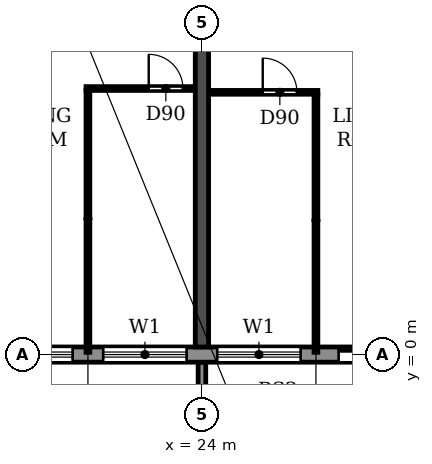
"""IFC4 building model, lengths in metres.
Left out: names, types, materials, properties, quantities, classifications, styles, units other than length and angle.
Written with IfcOpenShell. Run it as: python <this file> out.ifc"""

import sys

from ifc_helpers import new_model, si_unit, direction, frame, frame_2d, origin, place, context, subcontext, project, spatial, polyline, rectangle, outline, extrude, source, transform, mapped, element, fill, save


model = new_model("IFC4")
c1 = context("Model", 3, precision=1e-05, world=origin(), true_north=direction((0.0, 1.0)))
c2 = subcontext(c1, "Body", "Model", "MODEL_VIEW")
j1 = project(units=[si_unit("LENGTHUNIT", "METRE"), si_unit("PLANEANGLEUNIT", "RADIAN")], contexts=[c1])
p1 = place(None, origin())
s1 = spatial("IfcSite", under=j1, at=p1, CompositionType="ELEMENT")
p2 = place(p1, origin())
s2 = spatial("IfcBuilding", under=s1, at=p2, CompositionType="ELEMENT")
p3 = place(p2, frame((0.0, 0.0, 76.2)))
s3 = spatial("IfcBuildingStorey", under=s2, at=p3, CompositionType="ELEMENT", Elevation=76.2)
p4 = place(p3, frame((24.0, 0.2, 0.0), z_axis=(0.0, 0.0, 1.0), x_axis=(0.0, 1.0, 0.0)))
e1 = element("IfcWall", 1, at=p4, inside=s3, PredefinedType="SHEAR", context=c2, shape_type="SweptSolid", body=[
    extrude(rectangle(XDim=11.675, YDim=0.35, at=frame_2d((5.837, 0.0))), origin(), (0.0, 0.0, 1.0), 3.06),
])
p5 = place(p3, frame((10.683, 0.0, 0.0), z_axis=(0.0, 0.0, 1.0), x_axis=(1.0, 0.0, 0.0)))
e2 = element("IfcWall", 2, at=p5, inside=s3, PredefinedType="STANDARD", context=c2, shape_type="SweptSolid", body=[
    extrude(rectangle(XDim=80.634, YDim=0.4, at=frame_2d((40.317, 0.0))), origin(), (0.0, 0.0, 1.0), 3.06),
])
p6 = place(p5, frame((1.717, 0.0, 0.9)))
e3 = element("IfcOpeningElement", 3, at=p6, cuts=e2, PredefinedType="OPENING", context=c2, shape_type="SweptSolid", body=[
    extrude(rectangle(XDim=2.2, YDim=1.5, at=frame_2d((1.1, 0.75))), frame((0.0, 0.21, 0.0), z_axis=(0.0, -1.0, 0.0), x_axis=(1.0, 0.0, 0.0)), (0.0, 0.0, 1.0), 0.42),
])
p7 = place(p5, frame((4.917, 0.0, 0.0)))
e4 = element("IfcOpeningElement", 4, at=p7, cuts=e2, PredefinedType="OPENING", context=c2, shape_type="SweptSolid", body=[
    extrude(rectangle(XDim=1.8, YDim=2.4, at=frame_2d((0.9, 1.2))), frame((0.0, 0.21, 0.0), z_axis=(0.0, -1.0, 0.0), x_axis=(1.0, 0.0, 0.0)), (0.0, 0.0, 1.0), 0.42),
])
p8 = place(p5, frame((7.717, 0.0, 0.9)))
e5 = element("IfcOpeningElement", 5, at=p8, cuts=e2, PredefinedType="OPENING", context=c2, shape_type="SweptSolid", body=[
    extrude(rectangle(XDim=2.2, YDim=1.5, at=frame_2d((1.1, 0.75))), frame((0.0, 0.21, 0.0), z_axis=(0.0, -1.0, 0.0), x_axis=(1.0, 0.0, 0.0)), (0.0, 0.0, 1.0), 0.42),
])
p9 = place(p5, frame((10.717, 0.0, 0.9)))
e6 = element("IfcOpeningElement", 6, at=p9, cuts=e2, PredefinedType="OPENING", context=c2, shape_type="SweptSolid", body=[
    extrude(rectangle(XDim=2.2, YDim=1.5, at=frame_2d((1.1, 0.75))), frame((0.0, 0.21, 0.0), z_axis=(0.0, -1.0, 0.0), x_axis=(1.0, 0.0, 0.0)), (0.0, 0.0, 1.0), 0.42),
])
p10 = place(p5, frame((13.717, 0.0, 0.9)))
e7 = element("IfcOpeningElement", 7, at=p10, cuts=e2, PredefinedType="OPENING", context=c2, shape_type="SweptSolid", body=[
    extrude(rectangle(XDim=2.2, YDim=1.5, at=frame_2d((1.1, 0.75))), frame((0.0, 0.21, 0.0), z_axis=(0.0, -1.0, 0.0), x_axis=(1.0, 0.0, 0.0)), (0.0, 0.0, 1.0), 0.42),
])
p11 = place(p5, frame((16.917, 0.0, 0.0)))
e8 = element("IfcOpeningElement", 8, at=p11, cuts=e2, PredefinedType="OPENING", context=c2, shape_type="SweptSolid", body=[
    extrude(rectangle(XDim=1.8, YDim=2.4, at=frame_2d((0.9, 1.2))), frame((0.0, 0.21, 0.0), z_axis=(0.0, -1.0, 0.0), x_axis=(1.0, 0.0, 0.0)), (0.0, 0.0, 1.0), 0.42),
])
p12 = place(p5, frame((19.717, 0.0, 0.9)))
e9 = element("IfcOpeningElement", 9, at=p12, cuts=e2, PredefinedType="OPENING", context=c2, shape_type="SweptSolid", body=[
    extrude(rectangle(XDim=2.2, YDim=1.5, at=frame_2d((1.1, 0.75))), frame((0.0, 0.21, 0.0), z_axis=(0.0, -1.0, 0.0), x_axis=(1.0, 0.0, 0.0)), (0.0, 0.0, 1.0), 0.42),
])
p13 = place(p5, frame((22.717, 0.0, 0.9)))
e10 = element("IfcOpeningElement", 10, at=p13, cuts=e2, PredefinedType="OPENING", context=c2, shape_type="SweptSolid", body=[
    extrude(rectangle(XDim=2.2, YDim=1.5, at=frame_2d((1.1, 0.75))), frame((0.0, 0.21, 0.0), z_axis=(0.0, -1.0, 0.0), x_axis=(1.0, 0.0, 0.0)), (0.0, 0.0, 1.0), 0.42),
])
p14 = place(p5, frame((25.917, 0.0, 0.0)))
e11 = element("IfcOpeningElement", 11, at=p14, cuts=e2, PredefinedType="OPENING", context=c2, shape_type="SweptSolid", body=[
    extrude(rectangle(XDim=1.8, YDim=2.4, at=frame_2d((0.9, 1.2))), frame((0.0, 0.21, 0.0), z_axis=(0.0, -1.0, 0.0), x_axis=(1.0, 0.0, 0.0)), (0.0, 0.0, 1.0), 0.42),
])
p15 = place(p5, frame((28.717, 0.0, 0.9)))
e12 = element("IfcOpeningElement", 12, at=p15, cuts=e2, PredefinedType="OPENING", context=c2, shape_type="SweptSolid", body=[
    extrude(rectangle(XDim=2.2, YDim=1.5, at=frame_2d((1.1, 0.75))), frame((0.0, 0.21, 0.0), z_axis=(0.0, -1.0, 0.0), x_axis=(1.0, 0.0, 0.0)), (0.0, 0.0, 1.0), 0.42),
])
p16 = place(p5, frame((31.717, 0.0, 0.9)))
e13 = element("IfcOpeningElement", 13, at=p16, cuts=e2, PredefinedType="OPENING", context=c2, shape_type="SweptSolid", body=[
    extrude(rectangle(XDim=2.2, YDim=1.5, at=frame_2d((1.1, 0.75))), frame((0.0, 0.21, 0.0), z_axis=(0.0, -1.0, 0.0), x_axis=(1.0, 0.0, 0.0)), (0.0, 0.0, 1.0), 0.42),
])
p17 = place(p5, frame((34.717, 0.0, 0.9)))
e14 = element("IfcOpeningElement", 14, at=p17, cuts=e2, PredefinedType="OPENING", context=c2, shape_type="SweptSolid", body=[
    extrude(rectangle(XDim=2.2, YDim=1.5, at=frame_2d((1.1, 0.75))), frame((0.0, 0.21, 0.0), z_axis=(0.0, -1.0, 0.0), x_axis=(1.0, 0.0, 0.0)), (0.0, 0.0, 1.0), 0.42),
])
p18 = place(p5, frame((37.917, 0.0, 0.0)))
e15 = element("IfcOpeningElement", 15, at=p18, cuts=e2, PredefinedType="OPENING", context=c2, shape_type="SweptSolid", body=[
    extrude(rectangle(XDim=1.8, YDim=2.4, at=frame_2d((0.9, 1.2))), frame((0.0, 0.21, 0.0), z_axis=(0.0, -1.0, 0.0), x_axis=(1.0, 0.0, 0.0)), (0.0, 0.0, 1.0), 0.42),
])
p19 = place(p5, frame((40.717, 0.0, 0.9)))
e16 = element("IfcOpeningElement", 16, at=p19, cuts=e2, PredefinedType="OPENING", context=c2, shape_type="SweptSolid", body=[
    extrude(rectangle(XDim=2.2, YDim=1.5, at=frame_2d((1.1, 0.75))), frame((0.0, 0.21, 0.0), z_axis=(0.0, -1.0, 0.0), x_axis=(1.0, 0.0, 0.0)), (0.0, 0.0, 1.0), 0.42),
])
p20 = place(p5, frame((43.717, 0.0, 0.9)))
e17 = element("IfcOpeningElement", 17, at=p20, cuts=e2, PredefinedType="OPENING", context=c2, shape_type="SweptSolid", body=[
    extrude(rectangle(XDim=2.2, YDim=1.5, at=frame_2d((1.1, 0.75))), frame((0.0, 0.21, 0.0), z_axis=(0.0, -1.0, 0.0), x_axis=(1.0, 0.0, 0.0)), (0.0, 0.0, 1.0), 0.42),
])
p21 = place(p5, frame((46.717, 0.0, 0.9)))
e18 = element("IfcOpeningElement", 18, at=p21, cuts=e2, PredefinedType="OPENING", context=c2, shape_type="SweptSolid", body=[
    extrude(rectangle(XDim=2.2, YDim=1.5, at=frame_2d((1.1, 0.75))), frame((0.0, 0.21, 0.0), z_axis=(0.0, -1.0, 0.0), x_axis=(1.0, 0.0, 0.0)), (0.0, 0.0, 1.0), 0.42),
])
p22 = place(p5, frame((49.917, 0.0, 0.0)))
e19 = element("IfcOpeningElement", 19, at=p22, cuts=e2, PredefinedType="OPENING", context=c2, shape_type="SweptSolid", body=[
    extrude(rectangle(XDim=1.8, YDim=2.4, at=frame_2d((0.9, 1.2))), frame((0.0, 0.21, 0.0), z_axis=(0.0, -1.0, 0.0), x_axis=(1.0, 0.0, 0.0)), (0.0, 0.0, 1.0), 0.42),
])
p23 = place(p5, frame((52.717, 0.0, 0.9)))
e20 = element("IfcOpeningElement", 20, at=p23, cuts=e2, PredefinedType="OPENING", context=c2, shape_type="SweptSolid", body=[
    extrude(rectangle(XDim=2.2, YDim=1.5, at=frame_2d((1.1, 0.75))), frame((0.0, 0.21, 0.0), z_axis=(0.0, -1.0, 0.0), x_axis=(1.0, 0.0, 0.0)), (0.0, 0.0, 1.0), 0.42),
])
p24 = place(p5, frame((55.717, 0.0, 0.9)))
e21 = element("IfcOpeningElement", 21, at=p24, cuts=e2, PredefinedType="OPENING", context=c2, shape_type="SweptSolid", body=[
    extrude(rectangle(XDim=2.2, YDim=1.5, at=frame_2d((1.1, 0.75))), frame((0.0, 0.21, 0.0), z_axis=(0.0, -1.0, 0.0), x_axis=(1.0, 0.0, 0.0)), (0.0, 0.0, 1.0), 0.42),
])
p25 = place(p5, frame((58.717, 0.0, 0.9)))
e22 = element("IfcOpeningElement", 22, at=p25, cuts=e2, PredefinedType="OPENING", context=c2, shape_type="SweptSolid", body=[
    extrude(rectangle(XDim=2.2, YDim=1.5, at=frame_2d((1.1, 0.75))), frame((0.0, 0.21, 0.0), z_axis=(0.0, -1.0, 0.0), x_axis=(1.0, 0.0, 0.0)), (0.0, 0.0, 1.0), 0.42),
])
p26 = place(p5, frame((61.717, 0.0, 0.9)))
e23 = element("IfcOpeningElement", 23, at=p26, cuts=e2, PredefinedType="OPENING", context=c2, shape_type="SweptSolid", body=[
    extrude(rectangle(XDim=2.2, YDim=1.5, at=frame_2d((1.1, 0.75))), frame((0.0, 0.21, 0.0), z_axis=(0.0, -1.0, 0.0), x_axis=(1.0, 0.0, 0.0)), (0.0, 0.0, 1.0), 0.42),
])
p27 = place(p5, frame((64.917, 0.0, 0.0)))
e24 = element("IfcOpeningElement", 24, at=p27, cuts=e2, PredefinedType="OPENING", context=c2, shape_type="SweptSolid", body=[
    extrude(rectangle(XDim=1.8, YDim=2.4, at=frame_2d((0.9, 1.2))), frame((0.0, 0.21, 0.0), z_axis=(0.0, -1.0, 0.0), x_axis=(1.0, 0.0, 0.0)), (0.0, 0.0, 1.0), 0.42),
])
p28 = place(p5, frame((67.717, 0.0, 0.9)))
e25 = element("IfcOpeningElement", 25, at=p28, cuts=e2, PredefinedType="OPENING", context=c2, shape_type="SweptSolid", body=[
    extrude(rectangle(XDim=2.2, YDim=1.5, at=frame_2d((1.1, 0.75))), frame((0.0, 0.21, 0.0), z_axis=(0.0, -1.0, 0.0), x_axis=(1.0, 0.0, 0.0)), (0.0, 0.0, 1.0), 0.42),
])
p29 = place(p5, frame((70.717, 0.0, 0.9)))
e26 = element("IfcOpeningElement", 26, at=p29, cuts=e2, PredefinedType="OPENING", context=c2, shape_type="SweptSolid", body=[
    extrude(rectangle(XDim=2.2, YDim=1.5, at=frame_2d((1.1, 0.75))), frame((0.0, 0.21, 0.0), z_axis=(0.0, -1.0, 0.0), x_axis=(1.0, 0.0, 0.0)), (0.0, 0.0, 1.0), 0.42),
])
p30 = place(p5, frame((73.917, 0.0, 0.0)))
e27 = element("IfcOpeningElement", 27, at=p30, cuts=e2, PredefinedType="OPENING", context=c2, shape_type="SweptSolid", body=[
    extrude(rectangle(XDim=1.8, YDim=2.4, at=frame_2d((0.9, 1.2))), frame((0.0, 0.21, 0.0), z_axis=(0.0, -1.0, 0.0), x_axis=(1.0, 0.0, 0.0)), (0.0, 0.0, 1.0), 0.42),
])
p31 = place(p5, frame((76.717, 0.0, 0.9)))
e28 = element("IfcOpeningElement", 28, at=p31, cuts=e2, PredefinedType="OPENING", context=c2, shape_type="SweptSolid", body=[
    extrude(rectangle(XDim=2.2, YDim=1.5, at=frame_2d((1.1, 0.75))), frame((0.0, 0.21, 0.0), z_axis=(0.0, -1.0, 0.0), x_axis=(1.0, 0.0, 0.0)), (0.0, 0.0, 1.0), 0.42),
])
m1 = source(origin(), c2, "Body", "SweptSolid", [
    extrude(outline(polyline([(0.0, 0.0), (0.2, 0.0), (0.2, 1.65), (0.0, 1.65), (0.0, 0.0)])), origin(), (0.0, 0.0, 1.0), 3.1),
])
p32 = place(p3, frame((23.9, -1.85, 0.0)))
e29 = element("IfcWall", 29, at=p32, inside=s3, PredefinedType="STANDARD", context=c2, shape_type="MappedRepresentation", body=[
    mapped(m1, transform((0.0, 0.0, 0.0))),
])
p33 = place(p3, frame((24.185, 6.9, 0.0), z_axis=(0.0, 0.0, 1.0), x_axis=(1.0, 0.0, 0.0)))
e30 = element("IfcWall", 30, at=p33, inside=s3, PredefinedType="PARTITIONING", context=c2, shape_type="SweptSolid", body=[
    extrude(rectangle(XDim=2.865, YDim=0.1, at=frame_2d((1.433, 0.0))), origin(), (0.0, 0.0, 1.0), 3.06),
])
p34 = place(p33, frame((1.415, 0.0, 0.0)))
e31 = element("IfcOpeningElement", 31, at=p34, cuts=e30, PredefinedType="OPENING", context=c2, shape_type="SweptSolid", body=[
    extrude(rectangle(XDim=0.9, YDim=2.1, at=frame_2d((0.45, 1.05))), frame((0.0, 0.06, 0.0), z_axis=(0.0, -1.0, 0.0), x_axis=(1.0, 0.0, 0.0)), (0.0, 0.0, 1.0), 0.12),
])
p35 = place(p3, frame((20.95, 7.0, 0.0), z_axis=(0.0, 0.0, 1.0), x_axis=(1.0, 0.0, 0.0)))
e32 = element("IfcWall", 32, at=p35, inside=s3, PredefinedType="PARTITIONING", context=c2, shape_type="SweptSolid", body=[
    extrude(rectangle(XDim=2.865, YDim=0.1, at=frame_2d((1.433, 0.0))), origin(), (0.0, 0.0, 1.0), 3.06),
])
p36 = place(p35, frame((1.65, 0.0, 0.0)))
e33 = element("IfcOpeningElement", 33, at=p36, cuts=e32, PredefinedType="OPENING", context=c2, shape_type="SweptSolid", body=[
    extrude(rectangle(XDim=0.9, YDim=2.1, at=frame_2d((0.45, 1.05))), frame((0.0, 0.06, 0.0), z_axis=(0.0, -1.0, 0.0), x_axis=(1.0, 0.0, 0.0)), (0.0, 0.0, 1.0), 0.12),
])
p37 = place(p3, frame((21.0, 0.06, 0.0), z_axis=(0.0, 0.0, 1.0), x_axis=(0.0, 1.0, 0.0)))
e34 = element("IfcWall", 34, at=p37, inside=s3, PredefinedType="PARTITIONING", context=c2, shape_type="SweptSolid", body=[
    extrude(rectangle(XDim=6.89, YDim=0.1, at=frame_2d((3.445, 0.0))), origin(), (0.0, 0.0, 1.0), 3.06),
])
p38 = place(p3, frame((27.0, 0.06, 0.0), z_axis=(0.0, 0.0, 1.0), x_axis=(0.0, 1.0, 0.0)))
e35 = element("IfcWall", 35, at=p38, inside=s3, PredefinedType="PARTITIONING", context=c2, shape_type="SweptSolid", body=[
    extrude(rectangle(XDim=6.79, YDim=0.1, at=frame_2d((3.395, 0.0))), origin(), (0.0, 0.0, 1.0), 3.06),
])
p39 = place(p8, origin())
e36 = element("IfcWindow", 36, at=p39, inside=s3, PartitioningType="DOUBLE_PANEL_HORIZONTAL", PredefinedType="WINDOW", context=c2, shape_type="SweptSolid", body=[
    extrude(rectangle(XDim=2.2, YDim=1.5, at=frame_2d((1.1, 0.75))), frame((0.0, 0.03, 0.0), z_axis=(0.0, -1.0, 0.0), x_axis=(1.0, 0.0, 0.0)), (0.0, 0.0, 1.0), 0.06),
])
fill(e5, e36)
p40 = place(p9, origin())
e37 = element("IfcWindow", 37, at=p40, inside=s3, PartitioningType="DOUBLE_PANEL_HORIZONTAL", PredefinedType="WINDOW", context=c2, shape_type="SweptSolid", body=[
    extrude(rectangle(XDim=2.2, YDim=1.5, at=frame_2d((1.1, 0.75))), frame((0.0, 0.03, 0.0), z_axis=(0.0, -1.0, 0.0), x_axis=(1.0, 0.0, 0.0)), (0.0, 0.0, 1.0), 0.06),
])
fill(e6, e37)
p41 = place(p10, origin())
e38 = element("IfcWindow", 38, at=p41, inside=s3, PartitioningType="DOUBLE_PANEL_HORIZONTAL", PredefinedType="WINDOW", context=c2, shape_type="SweptSolid", body=[
    extrude(rectangle(XDim=2.2, YDim=1.5, at=frame_2d((1.1, 0.75))), frame((0.0, 0.03, 0.0), z_axis=(0.0, -1.0, 0.0), x_axis=(1.0, 0.0, 0.0)), (0.0, 0.0, 1.0), 0.06),
])
fill(e7, e38)
p42 = place(p11, origin())
e39 = element("IfcDoor", 39, at=p42, inside=s3, OperationType="DOUBLE_DOOR_SLIDING", PredefinedType="DOOR", context=c2, shape_type="SweptSolid", body=[
    extrude(rectangle(XDim=1.8, YDim=2.4, at=frame_2d((0.9, 1.2))), frame((0.0, 0.025, 0.0), z_axis=(0.0, -1.0, 0.0), x_axis=(1.0, 0.0, 0.0)), (0.0, 0.0, 1.0), 0.05),
])
fill(e8, e39)
p43 = place(p36, origin())
e40 = element("IfcDoor", 40, at=p43, inside=s3, OperationType="SINGLE_SWING_LEFT", PredefinedType="DOOR", context=c2, shape_type="SweptSolid", body=[
    extrude(rectangle(XDim=0.9, YDim=2.1, at=frame_2d((0.45, 1.05))), frame((0.0, 0.025, 0.0), z_axis=(0.0, -1.0, 0.0), x_axis=(1.0, 0.0, 0.0)), (0.0, 0.0, 1.0), 0.05),
])
fill(e33, e40)
p44 = place(p34, origin())
e41 = element("IfcDoor", 41, at=p44, inside=s3, OperationType="SINGLE_SWING_LEFT", PredefinedType="DOOR", context=c2, shape_type="SweptSolid", body=[
    extrude(rectangle(XDim=0.9, YDim=2.1, at=frame_2d((0.45, 1.05))), frame((0.0, 0.025, 0.0), z_axis=(0.0, -1.0, 0.0), x_axis=(1.0, 0.0, 0.0)), (0.0, 0.0, 1.0), 0.05),
])
fill(e31, e41)
save(model, sys.argv[1])
